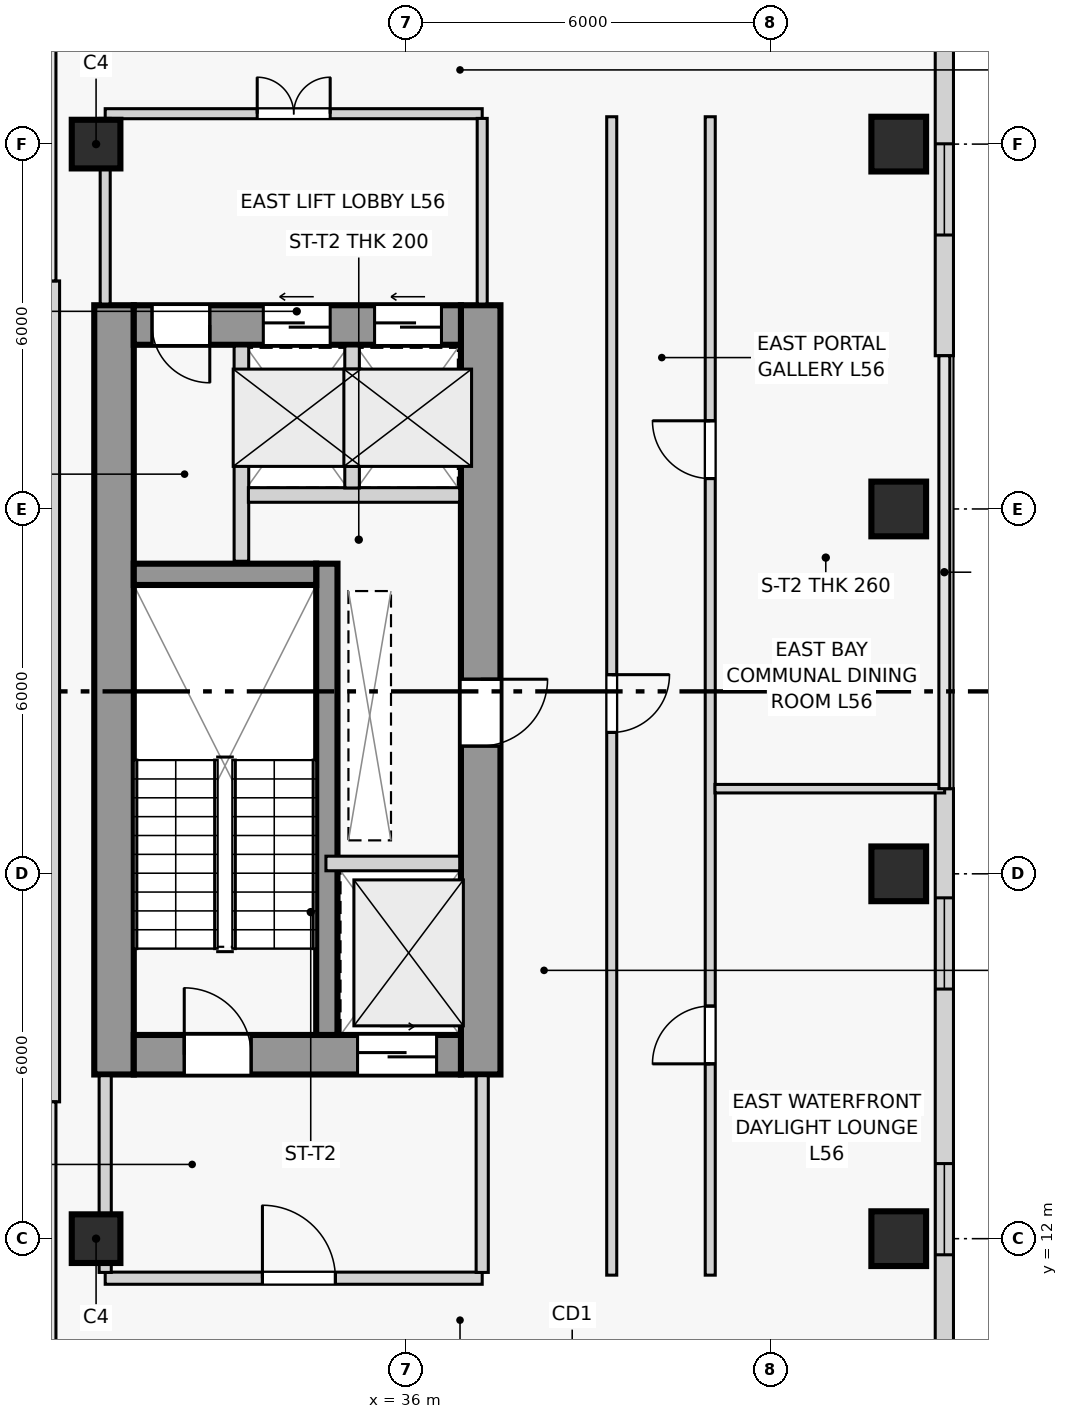
"""IFC4 building model, lengths in metres.
Left out: names, types, materials, properties, quantities, classifications, styles, units other than length and angle.
Written with IfcOpenShell. Run it as: python <this file> out.ifc"""

import sys

from ifc_helpers import new_model, si_unit, direction, frame, frame_2d, origin, origin_2d, place, context, subcontext, project, spatial, rectangle, extrude, source, transform, mapped, element, fill, save


model = new_model("IFC4")
c1 = context("Model", 3, precision=1e-05, world=origin(), true_north=direction((0.0, 1.0)))
c2 = subcontext(c1, "Body", "Model", "MODEL_VIEW")
j1 = project(units=[si_unit("LENGTHUNIT", "METRE"), si_unit("PLANEANGLEUNIT", "RADIAN")], contexts=[c1])
p1 = place(None, origin())
s1 = spatial("IfcSite", under=j1, at=p1, CompositionType="ELEMENT")
p2 = place(p1, origin())
s2 = spatial("IfcBuilding", under=s1, at=p2, CompositionType="ELEMENT")
p3 = place(p2, frame((0.0, 0.0, 213.3)))
s3 = spatial("IfcBuildingStorey", under=s2, at=p3, CompositionType="ELEMENT", Elevation=213.3)
p4 = place(p3, frame((31.195, 14.7, 0.0), z_axis=(0.0, 0.0, 1.0), x_axis=(0.0, 1.0, 0.0)))
e1 = element("IfcWall", 1, at=p4, inside=s3, PredefinedType="SHEAR", context=c2, shape_type="SweptSolid", body=[
    extrude(rectangle(XDim=12.65, YDim=0.65, at=frame_2d((6.325, 0.0))), origin(), (0.0, 0.0, 1.0), 3.6),
])
p5 = place(p3, frame((37.225, 14.7, 0.0), z_axis=(0.0, 0.0, 1.0), x_axis=(0.0, 1.0, 0.0)))
e2 = element("IfcWall", 2, at=p5, inside=s3, PredefinedType="SHEAR", context=c2, shape_type="SweptSolid", body=[
    extrude(rectangle(XDim=12.65, YDim=0.65, at=frame_2d((6.325, 0.0))), origin(), (0.0, 0.0, 1.0), 3.6),
])
p6 = place(p5, frame((5.4, 0.0, 0.0)))
e3 = element("IfcOpeningElement", 3, at=p6, cuts=e2, PredefinedType="OPENING", context=c2, shape_type="SweptSolid", body=[
    extrude(rectangle(XDim=1.1, YDim=2.2, at=frame_2d((0.55, 1.1))), frame((0.0, 0.335, 0.0), z_axis=(0.0, -1.0, 0.0), x_axis=(1.0, 0.0, 0.0)), (0.0, 0.0, 1.0), 0.67),
])
p7 = place(p3, frame((31.52, 15.025, 0.0), z_axis=(0.0, 0.0, 1.0), x_axis=(1.0, 0.0, 0.0)))
e4 = element("IfcWall", 4, at=p7, inside=s3, PredefinedType="SHEAR", context=c2, shape_type="SweptSolid", body=[
    extrude(rectangle(XDim=5.38, YDim=0.65, at=frame_2d((2.69, 0.0))), origin(), (0.0, 0.0, 1.0), 3.6),
])
p8 = place(p7, frame((0.83, 0.0, 0.0)))
e5 = element("IfcOpeningElement", 5, at=p8, cuts=e4, PredefinedType="OPENING", context=c2, shape_type="SweptSolid", body=[
    extrude(rectangle(XDim=1.1, YDim=2.2, at=frame_2d((0.55, 1.1))), frame((0.0, 0.335, 0.0), z_axis=(0.0, -1.0, 0.0), x_axis=(1.0, 0.0, 0.0)), (0.0, 0.0, 1.0), 0.67),
])
p9 = place(p7, frame((3.68, 0.0, 0.0)))
e6 = element("IfcOpeningElement", 6, at=p9, cuts=e4, PredefinedType="OPENING", context=c2, shape_type="SweptSolid", body=[
    extrude(rectangle(XDim=1.3, YDim=2.2, at=frame_2d((0.65, 1.1))), frame((0.0, 0.335, 0.0), z_axis=(0.0, -1.0, 0.0), x_axis=(1.0, 0.0, 0.0)), (0.0, 0.0, 1.0), 0.67),
])
p10 = place(p3, frame((31.52, 27.025, 0.0), z_axis=(0.0, 0.0, 1.0), x_axis=(1.0, 0.0, 0.0)))
e7 = element("IfcWall", 7, at=p10, inside=s3, PredefinedType="SHEAR", context=c2, shape_type="SweptSolid", body=[
    extrude(rectangle(XDim=5.38, YDim=0.65, at=frame_2d((2.69, 0.0))), origin(), (0.0, 0.0, 1.0), 3.6),
])
p11 = place(p10, frame((0.3, 0.0, 0.0)))
e8 = element("IfcOpeningElement", 8, at=p11, cuts=e7, PredefinedType="OPENING", context=c2, shape_type="SweptSolid", body=[
    extrude(rectangle(XDim=0.95, YDim=2.1, at=frame_2d((0.475, 1.05))), frame((0.0, 0.335, 0.0), z_axis=(0.0, -1.0, 0.0), x_axis=(1.0, 0.0, 0.0)), (0.0, 0.0, 1.0), 0.67),
])
p12 = place(p10, frame((2.13, 0.0, 0.0)))
e9 = element("IfcOpeningElement", 9, at=p12, cuts=e7, PredefinedType="OPENING", context=c2, shape_type="SweptSolid", body=[
    extrude(rectangle(XDim=1.1, YDim=2.2, at=frame_2d((0.55, 1.1))), frame((0.0, 0.335, 0.0), z_axis=(0.0, -1.0, 0.0), x_axis=(1.0, 0.0, 0.0)), (0.0, 0.0, 1.0), 0.67),
])
p13 = place(p10, frame((3.96, 0.0, 0.0)))
e10 = element("IfcOpeningElement", 10, at=p13, cuts=e7, PredefinedType="OPENING", context=c2, shape_type="SweptSolid", body=[
    extrude(rectangle(XDim=1.1, YDim=2.2, at=frame_2d((0.55, 1.1))), frame((0.0, 0.335, 0.0), z_axis=(0.0, -1.0, 0.0), x_axis=(1.0, 0.0, 0.0)), (0.0, 0.0, 1.0), 0.67),
])
p14 = place(p3, frame((34.695, 15.35, 0.0), z_axis=(0.0, 0.0, 1.0), x_axis=(0.0, 1.0, 0.0)))
e11 = element("IfcWall", 11, at=p14, inside=s3, PredefinedType="SHEAR", context=c2, shape_type="SweptSolid", body=[
    extrude(rectangle(XDim=7.75, YDim=0.35, at=frame_2d((3.875, 0.0))), origin(), (0.0, 0.0, 1.0), 3.6),
])
p15 = place(p3, frame((31.52, 22.925, 0.0), z_axis=(0.0, 0.0, 1.0), x_axis=(1.0, 0.0, 0.0)))
e12 = element("IfcWall", 12, at=p15, inside=s3, PredefinedType="SHEAR", context=c2, shape_type="SweptSolid", body=[
    extrude(rectangle(XDim=3.0, YDim=0.35, at=frame_2d((1.5, 0.0))), origin(), (0.0, 0.0, 1.0), 3.6),
])
m1 = source(origin(), c2, "Body", "SweptSolid", [
    extrude(rectangle(XDim=0.9, YDim=0.9, at=origin_2d()), origin(), (0.0, 0.0, 1.0), 3.6),
])
for number, where, z_axis, x_axis in (
    (13, (44.1, 12.0, 0.0), (0.0, 0.0, 1.0), (1.0, 0.0, 0.0)),
    (14, (44.1, 18.0, 0.0), (0.0, 0.0, 1.0), (1.0, 0.0, 0.0)),
    (15, (44.1, 24.0, 0.0), (0.0, 0.0, 1.0), (1.0, 0.0, 0.0)),
    (16, (44.1, 30.0, 0.0), (0.0, 0.0, 1.0), (1.0, 0.0, 0.0)),
):
    element("IfcColumn", number, at=place(p3, frame(where, z_axis=z_axis, x_axis=x_axis)), inside=s3, PredefinedType="COLUMN", context=c2, shape_type="MappedRepresentation", body=[
        mapped(m1, transform((0.0, 0.0, 0.0), scale=1.0)),
    ])
m2 = source(origin(), c2, "Body", "SweptSolid", [
    extrude(rectangle(XDim=0.8, YDim=0.8, at=origin_2d()), origin(), (0.0, 0.0, 1.0), 3.6),
])
for number, where, z_axis, x_axis in (
    (17, (30.9, 12.0, 0.0), (0.0, 0.0, 1.0), (1.0, 0.0, 0.0)),
    (18, (30.9, 30.0, 0.0), (0.0, 0.0, 1.0), (1.0, 0.0, 0.0)),
):
    element("IfcColumn", number, at=place(p3, frame(where, z_axis=z_axis, x_axis=x_axis)), inside=s3, PredefinedType="COLUMN", context=c2, shape_type="MappedRepresentation", body=[
        mapped(m2, transform((0.0, 0.0, 0.0), scale=1.0)),
    ])
p16 = place(p3, frame((44.85, 3.75, 0.0), z_axis=(0.0, 0.0, 1.0), x_axis=(0.0, 1.0, 0.0)))
e19 = element("IfcWall", 19, at=p16, inside=s3, PredefinedType="SOLIDWALL", context=c2, shape_type="SweptSolid", body=[
    extrude(rectangle(XDim=15.65, YDim=0.3, at=frame_2d((7.825, 0.0))), origin(), (0.0, 0.0, 1.0), 2.95),
])
p17 = place(p16, frame((2.445, 0.0, 0.85)))
e20 = element("IfcOpeningElement", 20, at=p17, cuts=e19, PredefinedType="OPENING", context=c2, shape_type="SweptSolid", body=[
    extrude(rectangle(XDim=1.5, YDim=1.8, at=frame_2d((0.75, 0.9))), frame((0.0, 0.16, 0.0), z_axis=(0.0, -1.0, 0.0), x_axis=(1.0, 0.0, 0.0)), (0.0, 0.0, 1.0), 0.32),
])
p18 = place(p16, frame((7.985, 0.0, 0.85)))
e21 = element("IfcOpeningElement", 21, at=p18, cuts=e19, PredefinedType="OPENING", context=c2, shape_type="SweptSolid", body=[
    extrude(rectangle(XDim=1.5, YDim=1.8, at=frame_2d((0.75, 0.9))), frame((0.0, 0.16, 0.0), z_axis=(0.0, -1.0, 0.0), x_axis=(1.0, 0.0, 0.0)), (0.0, 0.0, 1.0), 0.32),
])
p19 = place(p16, frame((12.355, 0.0, 0.85)))
e22 = element("IfcOpeningElement", 22, at=p19, cuts=e19, PredefinedType="OPENING", context=c2, shape_type="SweptSolid", body=[
    extrude(rectangle(XDim=1.5, YDim=1.8, at=frame_2d((0.75, 0.9))), frame((0.0, 0.16, 0.0), z_axis=(0.0, -1.0, 0.0), x_axis=(1.0, 0.0, 0.0)), (0.0, 0.0, 1.0), 0.32),
])
p20 = place(p3, frame((44.85, 26.52, 0.0), z_axis=(0.0, 0.0, 1.0), x_axis=(0.0, 1.0, 0.0)))
e23 = element("IfcWall", 23, at=p20, inside=s3, PredefinedType="SOLIDWALL", context=c2, shape_type="SweptSolid", body=[
    extrude(rectangle(XDim=11.73, YDim=0.3, at=frame_2d((5.865, 0.0))), origin(), (0.0, 0.0, 1.0), 2.95),
])
p21 = place(p20, frame((1.985, 0.0, 0.85)))
e24 = element("IfcOpeningElement", 24, at=p21, cuts=e23, PredefinedType="OPENING", context=c2, shape_type="SweptSolid", body=[
    extrude(rectangle(XDim=1.5, YDim=1.8, at=frame_2d((0.75, 0.9))), frame((0.0, 0.16, 0.0), z_axis=(0.0, -1.0, 0.0), x_axis=(1.0, 0.0, 0.0)), (0.0, 0.0, 1.0), 0.32),
])
p22 = place(p20, frame((7.75, 0.0, 0.85)))
e25 = element("IfcOpeningElement", 25, at=p22, cuts=e23, PredefinedType="OPENING", context=c2, shape_type="SweptSolid", body=[
    extrude(rectangle(XDim=1.5, YDim=1.8, at=frame_2d((0.75, 0.9))), frame((0.0, 0.16, 0.0), z_axis=(0.0, -1.0, 0.0), x_axis=(1.0, 0.0, 0.0)), (0.0, 0.0, 1.0), 0.32),
])
p23 = place(p3, frame((30.15, 14.25, 0.0), z_axis=(0.0, 0.0, 1.0), x_axis=(0.0, 1.0, 0.0)))
e26 = element("IfcWall", 26, at=p23, inside=s3, PredefinedType="SOLIDWALL", context=c2, shape_type="SweptSolid", body=[
    extrude(rectangle(XDim=13.5, YDim=0.3, at=frame_2d((6.75, 0.0))), origin(), (0.0, 0.0, 1.0), 2.95),
])
p24 = place(p3, frame((34.68, 18.17, 0.0), z_axis=(0.0, 0.0, 1.0), x_axis=(1.0, 0.0, 0.0)))
e27 = element("IfcWall", 27, at=p24, inside=s3, PredefinedType="PARTITIONING", context=c2, shape_type="SweptSolid", body=[
    extrude(rectangle(XDim=2.2, YDim=0.24, at=frame_2d((1.1, 0.0))), origin(), (0.0, 0.0, 1.0), 2.95),
])
p25 = place(p3, frame((31.05, 11.35, 0.0), z_axis=(0.0, 0.0, 1.0), x_axis=(1.0, 0.0, 0.0)))
e28 = element("IfcWall", 28, at=p25, inside=s3, PredefinedType="PARTITIONING", context=c2, shape_type="SweptSolid", body=[
    extrude(rectangle(XDim=6.2, YDim=0.2, at=frame_2d((3.1, 0.0))), origin(), (0.0, 0.0, 1.0), 2.95),
])
p26 = place(p25, frame((2.586, 0.0, 0.0)))
e29 = element("IfcOpeningElement", 29, at=p26, cuts=e28, PredefinedType="OPENING", context=c2, shape_type="SweptSolid", body=[
    extrude(rectangle(XDim=1.2, YDim=2.2, at=frame_2d((0.6, 1.1))), frame((0.0, 0.11, 0.0), z_axis=(0.0, -1.0, 0.0), x_axis=(1.0, 0.0, 0.0)), (0.0, 0.0, 1.0), 0.22),
])
p27 = place(p3, frame((31.05, 11.445, 0.0), z_axis=(0.0, 0.0, 1.0), x_axis=(0.0, 1.0, 0.0)))
e30 = element("IfcWall", 30, at=p27, inside=s3, PredefinedType="PARTITIONING", context=c2, shape_type="SweptSolid", body=[
    extrude(rectangle(XDim=3.235, YDim=0.2, at=frame_2d((1.617, 0.0))), origin(), (0.0, 0.0, 1.0), 2.491),
])
p28 = place(p3, frame((37.25, 11.445, 0.0), z_axis=(0.0, 0.0, 1.0), x_axis=(0.0, 1.0, 0.0)))
e31 = element("IfcWall", 31, at=p28, inside=s3, PredefinedType="PARTITIONING", context=c2, shape_type="SweptSolid", body=[
    extrude(rectangle(XDim=3.235, YDim=0.2, at=frame_2d((1.617, 0.0))), origin(), (0.0, 0.0, 1.0), 2.95),
])
p29 = place(p3, frame((33.29, 23.14, 0.0), z_axis=(0.0, 0.0, 1.0), x_axis=(0.0, 1.0, 0.0)))
e32 = element("IfcWall", 32, at=p29, inside=s3, PredefinedType="PARTITIONING", context=c2, shape_type="SweptSolid", body=[
    extrude(rectangle(XDim=3.54, YDim=0.24, at=frame_2d((1.77, 0.0))), origin(), (0.0, 0.0, 1.0), 2.95),
])
p30 = place(p3, frame((33.405, 24.23, 0.0), z_axis=(0.0, 0.0, 1.0), x_axis=(1.0, 0.0, 0.0)))
e33 = element("IfcWall", 33, at=p30, inside=s3, PredefinedType="PARTITIONING", context=c2, shape_type="SweptSolid", body=[
    extrude(rectangle(XDim=3.475, YDim=0.24, at=frame_2d((1.737, 0.0))), origin(), (0.0, 0.0, 1.0), 2.95),
])
p31 = place(p3, frame((35.11, 24.345, 0.0), z_axis=(0.0, 0.0, 1.0), x_axis=(0.0, 1.0, 0.0)))
e34 = element("IfcWall", 34, at=p31, inside=s3, PredefinedType="PARTITIONING", context=c2, shape_type="SweptSolid", body=[
    extrude(rectangle(XDim=2.335, YDim=0.24, at=frame_2d((1.167, 0.0))), origin(), (0.0, 0.0, 1.0), 2.95),
])
p32 = place(p3, frame((31.05, 30.5, 0.0), z_axis=(0.0, 0.0, 1.0), x_axis=(1.0, 0.0, 0.0)))
e35 = element("IfcWall", 35, at=p32, inside=s3, PredefinedType="PARTITIONING", context=c2, shape_type="SweptSolid", body=[
    extrude(rectangle(XDim=6.2, YDim=0.165, at=frame_2d((3.1, 0.0))), origin(), (0.0, 0.0, 1.0), 2.95),
])
p33 = place(p32, frame((2.5, 0.0, 0.0)))
e36 = element("IfcOpeningElement", 36, at=p33, cuts=e35, PredefinedType="OPENING", context=c2, shape_type="SweptSolid", body=[
    extrude(rectangle(XDim=1.2, YDim=2.2, at=frame_2d((0.6, 1.1))), frame((0.0, 0.093, 0.0), z_axis=(0.0, -1.0, 0.0), x_axis=(1.0, 0.0, 0.0)), (0.0, 0.0, 1.0), 0.185),
])
p34 = place(p3, frame((31.05, 27.37, 0.0), z_axis=(0.0, 0.0, 1.0), x_axis=(0.0, 1.0, 0.0)))
e37 = element("IfcWall", 37, at=p34, inside=s3, PredefinedType="PARTITIONING", context=c2, shape_type="SweptSolid", body=[
    extrude(rectangle(XDim=3.052, YDim=0.165, at=frame_2d((1.526, 0.0))), origin(), (0.0, 0.0, 1.0), 2.491),
])
p35 = place(p3, frame((37.25, 27.37, 0.0), z_axis=(0.0, 0.0, 1.0), x_axis=(0.0, 1.0, 0.0)))
e38 = element("IfcWall", 38, at=p35, inside=s3, PredefinedType="PARTITIONING", context=c2, shape_type="SweptSolid", body=[
    extrude(rectangle(XDim=3.052, YDim=0.165, at=frame_2d((1.526, 0.0))), origin(), (0.0, 0.0, 1.0), 2.95),
])
p36 = place(p3, frame((41.0, 11.4, 0.0), z_axis=(0.0, 0.0, 1.0), x_axis=(0.0, 1.0, 0.0)))
e39 = element("IfcWall", 39, at=p36, inside=s3, PredefinedType="PARTITIONING", context=c2, shape_type="SweptSolid", body=[
    extrude(rectangle(XDim=19.05, YDim=0.165, at=frame_2d((9.525, 0.0))), origin(), (0.0, 0.0, 1.0), 2.95),
])
p37 = place(p36, frame((3.475, 0.0, 0.0)))
e40 = element("IfcOpeningElement", 40, at=p37, cuts=e39, PredefinedType="OPENING", context=c2, shape_type="SweptSolid", body=[
    extrude(rectangle(XDim=0.95, YDim=2.1, at=frame_2d((0.475, 1.05))), frame((0.0, 0.093, 0.0), z_axis=(0.0, -1.0, 0.0), x_axis=(1.0, 0.0, 0.0)), (0.0, 0.0, 1.0), 0.185),
])
p38 = place(p36, frame((13.1, 0.0, 0.0)))
e41 = element("IfcOpeningElement", 41, at=p38, cuts=e39, PredefinedType="OPENING", context=c2, shape_type="SweptSolid", body=[
    extrude(rectangle(XDim=0.95, YDim=2.1, at=frame_2d((0.475, 1.05))), frame((0.0, 0.093, 0.0), z_axis=(0.0, -1.0, 0.0), x_axis=(1.0, 0.0, 0.0)), (0.0, 0.0, 1.0), 0.185),
])
p39 = place(p3, frame((39.38, 11.4, 0.0), z_axis=(0.0, 0.0, 1.0), x_axis=(0.0, 1.0, 0.0)))
e42 = element("IfcWall", 42, at=p39, inside=s3, PredefinedType="PARTITIONING", context=c2, shape_type="SweptSolid", body=[
    extrude(rectangle(XDim=19.05, YDim=0.165, at=frame_2d((9.525, 0.0))), origin(), (0.0, 0.0, 1.0), 2.95),
])
p40 = place(p39, frame((8.925, 0.0, 0.0)))
e43 = element("IfcOpeningElement", 43, at=p40, cuts=e42, PredefinedType="OPENING", context=c2, shape_type="SweptSolid", body=[
    extrude(rectangle(XDim=0.95, YDim=2.1, at=frame_2d((0.475, 1.05))), frame((0.0, 0.093, 0.0), z_axis=(0.0, -1.0, 0.0), x_axis=(1.0, 0.0, 0.0)), (0.0, 0.0, 1.0), 0.185),
])
p41 = place(p3, frame((41.077, 19.4, 0.0), z_axis=(0.0, 0.0, 1.0), x_axis=(1.0, 0.0, 0.0)))
e44 = element("IfcWall", 44, at=p41, inside=s3, PredefinedType="PARTITIONING", context=c2, shape_type="SweptSolid", body=[
    extrude(rectangle(XDim=3.778, YDim=0.14, at=frame_2d((1.889, 0.0))), origin(), (0.0, 0.0, 1.0), 2.95),
])
m3 = source(origin(), c2, "Body", "SweptSolid", [
    extrude(rectangle(XDim=1.5, YDim=1.8, at=frame_2d((0.75, 0.9))), frame((0.0, 0.03, 0.0), z_axis=(0.0, -1.0, 0.0), x_axis=(1.0, 0.0, 0.0)), (0.0, 0.0, 1.0), 0.06),
])
p42 = place(p18, origin())
e45 = element("IfcWindow", 45, at=p42, inside=s3, PartitioningType="SINGLE_PANEL", PredefinedType="WINDOW", context=c2, shape_type="MappedRepresentation", body=[
    mapped(m3, transform((0.0, 0.0, 0.0), scale=1.0)),
])
fill(e21, e45)
p43 = place(p19, origin())
e46 = element("IfcWindow", 46, at=p43, inside=s3, PartitioningType="SINGLE_PANEL", PredefinedType="WINDOW", context=c2, shape_type="MappedRepresentation", body=[
    mapped(m3, transform((0.0, 0.0, 0.0), scale=1.0)),
])
fill(e22, e46)
p44 = place(p21, origin())
e47 = element("IfcWindow", 47, at=p44, inside=s3, PartitioningType="SINGLE_PANEL", PredefinedType="WINDOW", context=c2, shape_type="MappedRepresentation", body=[
    mapped(m3, transform((0.0, 0.0, 0.0), scale=1.0)),
])
fill(e24, e47)
m4 = source(origin(), c2, "Body", "SweptSolid", [
    extrude(rectangle(XDim=1.1, YDim=2.2, at=frame_2d((0.55, 1.1))), frame((0.0, 0.025, 0.0), z_axis=(0.0, -1.0, 0.0), x_axis=(1.0, 0.0, 0.0)), (0.0, 0.0, 1.0), 0.05),
])
p45 = place(p8, origin())
e48 = element("IfcDoor", 48, at=p45, inside=s3, OperationType="SINGLE_SWING_LEFT", PredefinedType="DOOR", context=c2, shape_type="MappedRepresentation", body=[
    mapped(m4, transform((0.0, 0.0, 0.0), scale=1.0)),
])
fill(e5, e48)
m5 = source(origin(), c2, "Body", "SweptSolid", [
    extrude(rectangle(XDim=1.3, YDim=2.2, at=frame_2d((0.65, 1.1))), frame((0.0, 0.025, 0.0), z_axis=(0.0, -1.0, 0.0), x_axis=(1.0, 0.0, 0.0)), (0.0, 0.0, 1.0), 0.05),
])
p46 = place(p9, origin())
e49 = element("IfcDoor", 49, at=p46, inside=s3, OperationType="SLIDING_TO_RIGHT", PredefinedType="DOOR", context=c2, shape_type="MappedRepresentation", body=[
    mapped(m5, transform((0.0, 0.0, 0.0), scale=1.0)),
])
fill(e6, e49)
m6 = source(origin(), c2, "Body", "SweptSolid", [
    extrude(rectangle(XDim=1.2, YDim=2.2, at=frame_2d((0.6, 1.1))), frame((0.0, 0.025, 0.0), z_axis=(0.0, -1.0, 0.0), x_axis=(1.0, 0.0, 0.0)), (0.0, 0.0, 1.0), 0.05),
])
p47 = place(p26, origin())
e50 = element("IfcDoor", 50, at=p47, inside=s3, OperationType="SINGLE_SWING_LEFT", PredefinedType="DOOR", context=c2, shape_type="MappedRepresentation", body=[
    mapped(m6, transform((0.0, 0.0, 0.0), scale=1.0)),
])
fill(e29, e50)
m7 = source(origin(), c2, "Body", "SweptSolid", [
    extrude(rectangle(XDim=0.95, YDim=2.1, at=frame_2d((0.475, 1.05))), frame((0.0, 0.025, 0.0), z_axis=(0.0, -1.0, 0.0), x_axis=(1.0, 0.0, 0.0)), (0.0, 0.0, 1.0), 0.05),
])
p48 = place(p11, frame((0.95, 0.0, 0.0), z_axis=(0.0, 0.0, 1.0), x_axis=(-1.0, 0.0, 0.0)))
e51 = element("IfcDoor", 51, at=p48, inside=s3, OperationType="SINGLE_SWING_LEFT", PredefinedType="DOOR", context=c2, shape_type="MappedRepresentation", body=[
    mapped(m7, transform((0.0, 0.0, 0.0), scale=1.0)),
])
fill(e8, e51)
m8 = source(origin(), c2, "Body", "SweptSolid", [
    extrude(rectangle(XDim=1.1, YDim=2.2, at=frame_2d((0.55, 1.1))), frame((0.0, 0.025, 0.0), z_axis=(0.0, -1.0, 0.0), x_axis=(1.0, 0.0, 0.0)), (0.0, 0.0, 1.0), 0.05),
])
p49 = place(p12, origin())
e52 = element("IfcDoor", 52, at=p49, inside=s3, OperationType="SLIDING_TO_LEFT", PredefinedType="DOOR", context=c2, shape_type="MappedRepresentation", body=[
    mapped(m8, transform((0.0, 0.0, 0.0), scale=1.0)),
])
fill(e9, e52)
p50 = place(p13, origin())
e53 = element("IfcDoor", 53, at=p50, inside=s3, OperationType="SLIDING_TO_LEFT", PredefinedType="DOOR", context=c2, shape_type="MappedRepresentation", body=[
    mapped(m8, transform((0.0, 0.0, 0.0), scale=1.0)),
])
fill(e10, e53)
p51 = place(p33, origin())
e54 = element("IfcDoor", 54, at=p51, inside=s3, OperationType="DOUBLE_DOOR_SINGLE_SWING", PredefinedType="DOOR", context=c2, shape_type="MappedRepresentation", body=[
    mapped(m6, transform((0.0, 0.0, 0.0), scale=1.0)),
])
fill(e36, e54)
p52 = place(p6, frame((1.1, 0.0, 0.0), z_axis=(0.0, 0.0, 1.0), x_axis=(-1.0, 0.0, 0.0)))
e55 = element("IfcDoor", 55, at=p52, inside=s3, OperationType="SINGLE_SWING_LEFT", PredefinedType="DOOR", context=c2, shape_type="MappedRepresentation", body=[
    mapped(m4, transform((0.0, 0.0, 0.0), scale=1.0)),
])
fill(e3, e55)
p53 = place(p40, frame((0.95, 0.0, 0.0), z_axis=(0.0, 0.0, 1.0), x_axis=(-1.0, 0.0, 0.0)))
e56 = element("IfcDoor", 56, at=p53, inside=s3, OperationType="SINGLE_SWING_LEFT", PredefinedType="DOOR", context=c2, shape_type="MappedRepresentation", body=[
    mapped(m7, transform((0.0, 0.0, 0.0), scale=1.0)),
])
fill(e43, e56)
p54 = place(p37, origin())
e57 = element("IfcDoor", 57, at=p54, inside=s3, OperationType="SINGLE_SWING_LEFT", PredefinedType="DOOR", context=c2, shape_type="MappedRepresentation", body=[
    mapped(m7, transform((0.0, 0.0, 0.0), scale=1.0)),
])
fill(e40, e57)
p55 = place(p38, origin())
e58 = element("IfcDoor", 58, at=p55, inside=s3, OperationType="SINGLE_SWING_RIGHT", PredefinedType="DOOR", context=c2, shape_type="MappedRepresentation", body=[
    mapped(m7, transform((0.0, 0.0, 0.0), scale=1.0)),
])
fill(e41, e58)
save(model, sys.argv[1])
